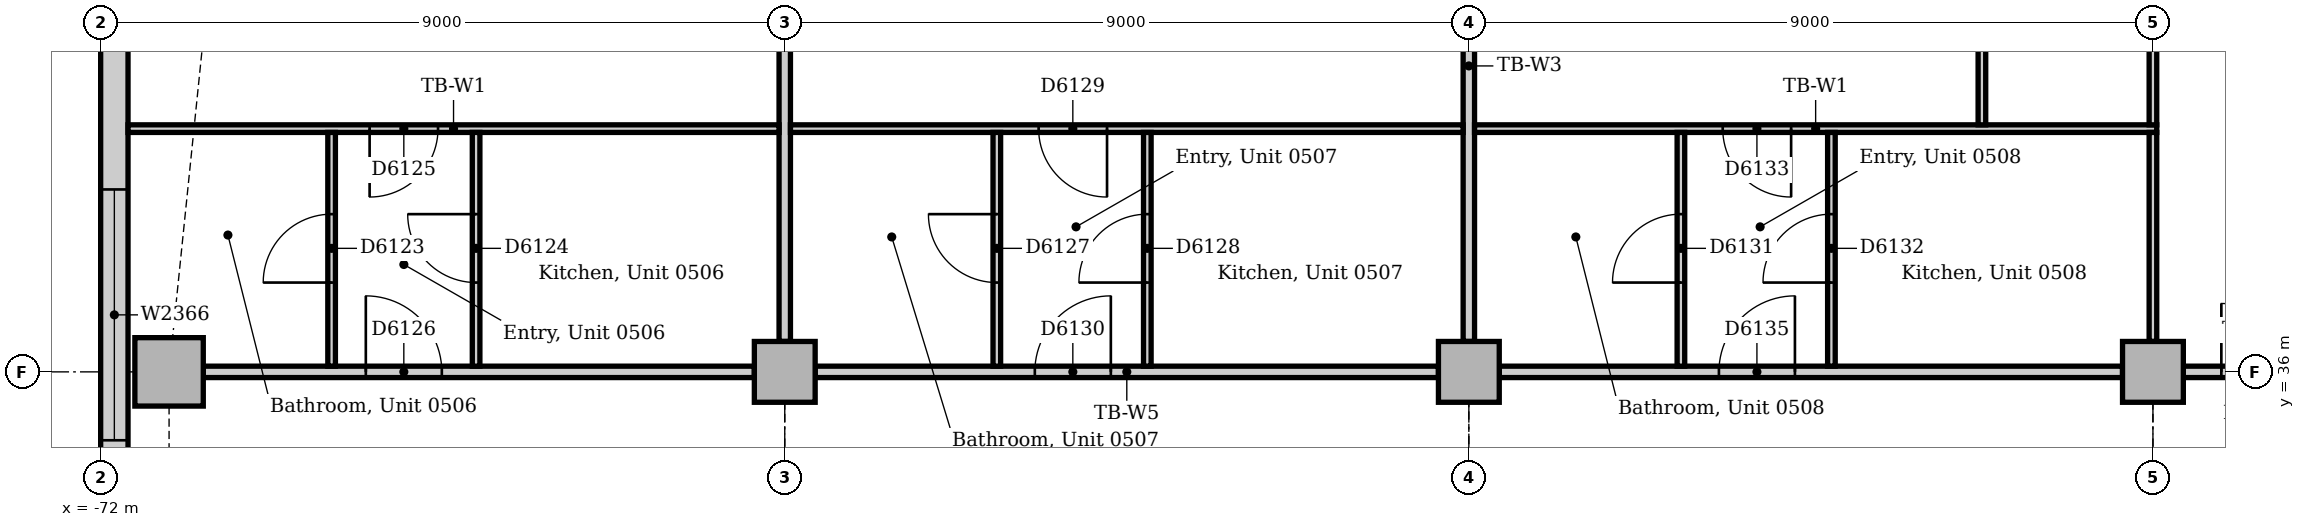
"""IFC4 building model, lengths in metres.
Left out: names, types, materials, properties, quantities, classifications, styles, units other than length and angle.
Written with IfcOpenShell. Run it as: python <this file> out.ifc"""

import sys

from ifc_helpers import new_model, si_unit, direction, frame, frame_2d, origin, origin_2d, place, context, subcontext, project, spatial, rectangle, extrude, element, fill, save


model = new_model("IFC4")
c1 = context("Model", 3, precision=1e-05, world=origin(), true_north=direction((0.0, 1.0)))
c2 = subcontext(c1, "Body", "Model", "MODEL_VIEW")
j1 = project(units=[si_unit("LENGTHUNIT", "METRE"), si_unit("PLANEANGLEUNIT", "RADIAN")], contexts=[c1])
p1 = place(None, origin())
s1 = spatial("IfcSite", under=j1, at=p1, CompositionType="ELEMENT")
p2 = place(p1, origin())
s2 = spatial("IfcBuilding", under=s1, at=p2, CompositionType="ELEMENT")
p3 = place(p2, frame((0.0, 0.0, 26.0)))
s3 = spatial("IfcBuildingStorey", under=s2, at=p3, CompositionType="ELEMENT", Elevation=26.0)
p4 = place(p3, frame((-71.1, 36.0, 0.0), z_axis=(0.0, 0.0, 1.0), x_axis=(1.0, 0.0, 0.0)))
e1 = element("IfcColumn", 1, at=p4, inside=s3, PredefinedType="COLUMN", context=c2, shape_type="SweptSolid", body=[
    extrude(rectangle(XDim=0.9, YDim=0.9, at=origin_2d()), origin(), (0.0, 0.0, 1.0), 3.85),
])
for number, where, z_axis, x_axis in (
    (2, (-63.0, 36.0, 0.0), (0.0, 0.0, 1.0), (1.0, 0.0, 0.0)),
    (3, (-54.0, 36.0, 0.0), (0.0, 0.0, 1.0), (1.0, 0.0, 0.0)),
    (4, (-45.0, 36.0, 0.0), (0.0, 0.0, 1.0), (1.0, 0.0, 0.0)),
):
    element("IfcColumn", number, at=place(p3, frame(where, z_axis=z_axis, x_axis=x_axis)), inside=s3, PredefinedType="COLUMN", context=c2, shape_type="SweptSolid", body=[
        extrude(rectangle(XDim=0.8, YDim=0.8, at=origin_2d()), origin(), (0.0, 0.0, 1.0), 3.85),
    ])
p5 = place(p3, frame((-71.82, 40.757, 0.0), z_axis=(0.0, 0.0, 1.0), x_axis=(0.0, -1.0, 0.0)))
e5 = element("IfcWall", 5, at=p5, inside=s3, PredefinedType="STANDARD", context=c2, shape_type="SweptSolid", body=[
    extrude(rectangle(XDim=26.015, YDim=0.36, at=frame_2d((13.007, 0.0))), origin(), (0.0, 0.0, 1.0), 3.85),
])
p6 = place(p5, frame((2.357, 0.0, 0.9)))
e6 = element("IfcOpeningElement", 6, at=p6, cuts=e5, PredefinedType="OPENING", context=c2, shape_type="SweptSolid", body=[
    extrude(rectangle(XDim=3.3, YDim=1.6, at=frame_2d((1.65, 0.8))), frame((0.0, 0.19, 0.0), z_axis=(0.0, -1.0, 0.0), x_axis=(1.0, 0.0, 0.0)), (0.0, 0.0, 1.0), 0.38),
])
p7 = place(p5, frame((7.057, 0.0, 0.9)))
e7 = element("IfcOpeningElement", 7, at=p7, cuts=e5, PredefinedType="OPENING", context=c2, shape_type="SweptSolid", body=[
    extrude(rectangle(XDim=3.3, YDim=1.6, at=frame_2d((1.65, 0.8))), frame((0.0, 0.19, 0.0), z_axis=(0.0, -1.0, 0.0), x_axis=(1.0, 0.0, 0.0)), (0.0, 0.0, 1.0), 0.38),
])
p8 = place(p5, frame((11.357, 0.0, 0.9)))
e8 = element("IfcOpeningElement", 8, at=p8, cuts=e5, PredefinedType="OPENING", context=c2, shape_type="SweptSolid", body=[
    extrude(rectangle(XDim=3.3, YDim=1.6, at=frame_2d((1.65, 0.8))), frame((0.0, 0.19, 0.0), z_axis=(0.0, -1.0, 0.0), x_axis=(1.0, 0.0, 0.0)), (0.0, 0.0, 1.0), 0.38),
])
p9 = place(p5, frame((15.857, 0.0, 0.9)))
e9 = element("IfcOpeningElement", 9, at=p9, cuts=e5, PredefinedType="OPENING", context=c2, shape_type="SweptSolid", body=[
    extrude(rectangle(XDim=3.3, YDim=1.6, at=frame_2d((1.65, 0.8))), frame((0.0, 0.19, 0.0), z_axis=(0.0, -1.0, 0.0), x_axis=(1.0, 0.0, 0.0)), (0.0, 0.0, 1.0), 0.38),
])
p10 = place(p5, frame((20.957, 0.0, 0.9)))
e10 = element("IfcOpeningElement", 10, at=p10, cuts=e5, PredefinedType="OPENING", context=c2, shape_type="SweptSolid", body=[
    extrude(rectangle(XDim=3.3, YDim=1.6, at=frame_2d((1.65, 0.8))), frame((0.0, 0.19, 0.0), z_axis=(0.0, -1.0, 0.0), x_axis=(1.0, 0.0, 0.0)), (0.0, 0.0, 1.0), 0.38),
])
p11 = place(p3, frame((-44.6, 36.0, 0.0), z_axis=(0.0, 0.0, 1.0), x_axis=(1.0, 0.0, 0.0)))
e11 = element("IfcWall", 11, at=p11, inside=s3, PredefinedType="PARTITIONING", context=c2, shape_type="SweptSolid", body=[
    extrude(rectangle(XDim=1.875, YDim=0.15, at=frame_2d((0.938, 0.0))), origin(), (0.0, 0.0, 1.0), 3.602),
])
p12 = place(p11, frame((0.5, 0.0, 0.0)))
e12 = element("IfcOpeningElement", 12, at=p12, cuts=e11, PredefinedType="OPENING", context=c2, shape_type="SweptSolid", body=[
    extrude(rectangle(XDim=0.9, YDim=2.1, at=frame_2d((0.45, 1.05))), frame((0.0, 0.085, 0.0), z_axis=(0.0, -1.0, 0.0), x_axis=(1.0, 0.0, 0.0)), (0.0, 0.0, 1.0), 0.17),
])
p13 = place(p3, frame((-53.6, 36.0, 0.0), z_axis=(0.0, 0.0, 1.0), x_axis=(1.0, 0.0, 0.0)))
e13 = element("IfcWall", 13, at=p13, inside=s3, PredefinedType="PARTITIONING", context=c2, shape_type="SweptSolid", body=[
    extrude(rectangle(XDim=8.2, YDim=0.15, at=frame_2d((4.1, 0.0))), origin(), (0.0, 0.0, 1.0), 3.15),
])
p14 = place(p13, frame((2.89, 0.0, 0.0)))
e14 = element("IfcOpeningElement", 14, at=p14, cuts=e13, PredefinedType="OPENING", context=c2, shape_type="SweptSolid", body=[
    extrude(rectangle(XDim=1.0, YDim=2.1, at=frame_2d((0.5, 1.05))), frame((0.0, 0.085, 0.0), z_axis=(0.0, -1.0, 0.0), x_axis=(1.0, 0.0, 0.0)), (0.0, 0.0, 1.0), 0.17),
])
p15 = place(p3, frame((-62.6, 36.0, 0.0), z_axis=(0.0, 0.0, 1.0), x_axis=(1.0, 0.0, 0.0)))
e15 = element("IfcWall", 15, at=p15, inside=s3, PredefinedType="PARTITIONING", context=c2, shape_type="SweptSolid", body=[
    extrude(rectangle(XDim=8.2, YDim=0.15, at=frame_2d((4.1, 0.0))), origin(), (0.0, 0.0, 1.0), 3.15),
])
p16 = place(p15, frame((2.89, 0.0, 0.0)))
e16 = element("IfcOpeningElement", 16, at=p16, cuts=e15, PredefinedType="OPENING", context=c2, shape_type="SweptSolid", body=[
    extrude(rectangle(XDim=1.0, YDim=2.1, at=frame_2d((0.5, 1.05))), frame((0.0, 0.085, 0.0), z_axis=(0.0, -1.0, 0.0), x_axis=(1.0, 0.0, 0.0)), (0.0, 0.0, 1.0), 0.17),
])
p17 = place(p3, frame((-70.65, 36.0, 0.0), z_axis=(0.0, 0.0, 1.0), x_axis=(1.0, 0.0, 0.0)))
e17 = element("IfcWall", 17, at=p17, inside=s3, PredefinedType="PARTITIONING", context=c2, shape_type="SweptSolid", body=[
    extrude(rectangle(XDim=7.25, YDim=0.15, at=frame_2d((3.625, 0.0))), origin(), (0.0, 0.0, 1.0), 3.15),
])
p18 = place(p17, frame((2.138, 0.0, 0.0)))
e18 = element("IfcOpeningElement", 18, at=p18, cuts=e17, PredefinedType="OPENING", context=c2, shape_type="SweptSolid", body=[
    extrude(rectangle(XDim=1.0, YDim=2.1, at=frame_2d((0.5, 1.05))), frame((0.0, 0.085, 0.0), z_axis=(0.0, -1.0, 0.0), x_axis=(1.0, 0.0, 0.0)), (0.0, 0.0, 1.0), 0.17),
])
for number, where, z_axis, x_axis in (
    (19, (-63.0, 36.4, 0.0), (0.0, 0.0, 1.0), (0.0, 1.0, 0.0)),
    (20, (-54.0, 36.4, 0.0), (0.0, 0.0, 1.0), (0.0, 1.0, 0.0)),
):
    element("IfcWall", number, at=place(p3, frame(where, z_axis=z_axis, x_axis=x_axis)), inside=s3, PredefinedType="PARTITIONING", context=c2, shape_type="SweptSolid", body=[
        extrude(rectangle(XDim=7.25, YDim=0.15, at=frame_2d((3.625, 0.0))), origin(), (0.0, 0.0, 1.0), 3.158),
    ])
p19 = place(p3, frame((-53.925, 39.2, 0.0), z_axis=(0.0, 0.0, 1.0), x_axis=(1.0, 0.0, 0.0)))
e21 = element("IfcWall", 21, at=p19, inside=s3, PredefinedType="PARTITIONING", context=c2, shape_type="SweptSolid", body=[
    extrude(rectangle(XDim=8.975, YDim=0.1, at=frame_2d((4.487, 0.0))), origin(), (0.0, 0.0, 1.0), 3.85),
])
p20 = place(p19, frame((3.265, 0.0, 0.0)))
e22 = element("IfcOpeningElement", 22, at=p20, cuts=e21, PredefinedType="OPENING", context=c2, shape_type="SweptSolid", body=[
    extrude(rectangle(XDim=0.9, YDim=2.1, at=frame_2d((0.45, 1.05))), frame((0.0, 0.06, 0.0), z_axis=(0.0, -1.0, 0.0), x_axis=(1.0, 0.0, 0.0)), (0.0, 0.0, 1.0), 0.12),
])
p21 = place(p3, frame((-62.925, 39.2, 0.0), z_axis=(0.0, 0.0, 1.0), x_axis=(1.0, 0.0, 0.0)))
e23 = element("IfcWall", 23, at=p21, inside=s3, PredefinedType="PARTITIONING", context=c2, shape_type="SweptSolid", body=[
    extrude(rectangle(XDim=8.85, YDim=0.1, at=frame_2d((4.425, 0.0))), origin(), (0.0, 0.0, 1.0), 3.85),
])
p22 = place(p21, frame((3.265, 0.0, 0.0)))
e24 = element("IfcOpeningElement", 24, at=p22, cuts=e23, PredefinedType="OPENING", context=c2, shape_type="SweptSolid", body=[
    extrude(rectangle(XDim=0.9, YDim=2.1, at=frame_2d((0.45, 1.05))), frame((0.0, 0.06, 0.0), z_axis=(0.0, -1.0, 0.0), x_axis=(1.0, 0.0, 0.0)), (0.0, 0.0, 1.0), 0.12),
])
p23 = place(p3, frame((-71.64, 39.2, 0.0), z_axis=(0.0, 0.0, 1.0), x_axis=(1.0, 0.0, 0.0)))
e25 = element("IfcWall", 25, at=p23, inside=s3, PredefinedType="PARTITIONING", context=c2, shape_type="SweptSolid", body=[
    extrude(rectangle(XDim=8.565, YDim=0.1, at=frame_2d((4.282, 0.0))), origin(), (0.0, 0.0, 1.0), 3.85),
])
p24 = place(p23, frame((3.178, 0.0, 0.0)))
e26 = element("IfcOpeningElement", 26, at=p24, cuts=e25, PredefinedType="OPENING", context=c2, shape_type="SweptSolid", body=[
    extrude(rectangle(XDim=0.9, YDim=2.1, at=frame_2d((0.45, 1.05))), frame((0.0, 0.06, 0.0), z_axis=(0.0, -1.0, 0.0), x_axis=(1.0, 0.0, 0.0)), (0.0, 0.0, 1.0), 0.12),
])
p25 = place(p3, frame((-45.0, 39.25, 0.0), z_axis=(0.0, 0.0, 1.0), x_axis=(0.0, 1.0, 0.0)))
e27 = element("IfcWall", 27, at=p25, inside=s3, PredefinedType="PARTITIONING", context=c2, shape_type="SweptSolid", body=[
    extrude(rectangle(XDim=4.4, YDim=0.1, at=frame_2d((2.2, 0.0))), origin(), (0.0, 0.0, 1.0), 3.158),
])
p26 = place(p3, frame((-45.0, 36.4, 0.0), z_axis=(0.0, 0.0, 1.0), x_axis=(0.0, 1.0, 0.0)))
e28 = element("IfcWall", 28, at=p26, inside=s3, PredefinedType="PARTITIONING", context=c2, shape_type="SweptSolid", body=[
    extrude(rectangle(XDim=2.75, YDim=0.1, at=frame_2d((1.375, 0.0))), origin(), (0.0, 0.0, 1.0), 3.158),
])
p27 = place(p3, frame((-47.25, 39.25, 0.0), z_axis=(0.0, 0.0, 1.0), x_axis=(0.0, 1.0, 0.0)))
e29 = element("IfcWall", 29, at=p27, inside=s3, PredefinedType="PARTITIONING", context=c2, shape_type="SweptSolid", body=[
    extrude(rectangle(XDim=5.39, YDim=0.1, at=frame_2d((2.695, 0.0))), origin(), (0.0, 0.0, 1.0), 3.85),
])
p28 = place(p27, frame((2.25, 0.0, 0.0)))
e30 = element("IfcOpeningElement", 30, at=p28, cuts=e29, PredefinedType="OPENING", context=c2, shape_type="SweptSolid", body=[
    extrude(rectangle(XDim=0.9, YDim=2.1, at=frame_2d((0.45, 1.05))), frame((0.0, 0.06, 0.0), z_axis=(0.0, -1.0, 0.0), x_axis=(1.0, 0.0, 0.0)), (0.0, 0.0, 1.0), 0.12),
])
p29 = place(p3, frame((-68.962, 36.075, 0.0), z_axis=(0.0, 0.0, 1.0), x_axis=(0.0, 1.0, 0.0)))
e31 = element("IfcWall", 31, at=p29, inside=s3, PredefinedType="PARTITIONING", context=c2, shape_type="SweptSolid", body=[
    extrude(rectangle(XDim=3.075, YDim=0.1, at=frame_2d((1.538, 0.0))), origin(), (0.0, 0.0, 1.0), 3.85),
])
p30 = place(p29, frame((1.1, 0.0, 0.0)))
e32 = element("IfcOpeningElement", 32, at=p30, cuts=e31, PredefinedType="OPENING", context=c2, shape_type="SweptSolid", body=[
    extrude(rectangle(XDim=0.9, YDim=2.1, at=frame_2d((0.45, 1.05))), frame((0.0, 0.06, 0.0), z_axis=(0.0, -1.0, 0.0), x_axis=(1.0, 0.0, 0.0)), (0.0, 0.0, 1.0), 0.12),
])
p31 = place(p3, frame((-67.061, 36.075, 0.0), z_axis=(0.0, 0.0, 1.0), x_axis=(0.0, 1.0, 0.0)))
e33 = element("IfcWall", 33, at=p31, inside=s3, PredefinedType="PARTITIONING", context=c2, shape_type="SweptSolid", body=[
    extrude(rectangle(XDim=3.075, YDim=0.1, at=frame_2d((1.538, 0.0))), origin(), (0.0, 0.0, 1.0), 3.85),
])
p32 = place(p31, frame((1.1, 0.0, 0.0)))
e34 = element("IfcOpeningElement", 34, at=p32, cuts=e33, PredefinedType="OPENING", context=c2, shape_type="SweptSolid", body=[
    extrude(rectangle(XDim=0.9, YDim=2.1, at=frame_2d((0.45, 1.05))), frame((0.0, 0.06, 0.0), z_axis=(0.0, -1.0, 0.0), x_axis=(1.0, 0.0, 0.0)), (0.0, 0.0, 1.0), 0.12),
])
p33 = place(p3, frame((-60.21, 36.075, 0.0), z_axis=(0.0, 0.0, 1.0), x_axis=(0.0, 1.0, 0.0)))
e35 = element("IfcWall", 35, at=p33, inside=s3, PredefinedType="PARTITIONING", context=c2, shape_type="SweptSolid", body=[
    extrude(rectangle(XDim=3.075, YDim=0.1, at=frame_2d((1.538, 0.0))), origin(), (0.0, 0.0, 1.0), 3.85),
])
p34 = place(p33, frame((1.1, 0.0, 0.0)))
e36 = element("IfcOpeningElement", 36, at=p34, cuts=e35, PredefinedType="OPENING", context=c2, shape_type="SweptSolid", body=[
    extrude(rectangle(XDim=0.9, YDim=2.1, at=frame_2d((0.45, 1.05))), frame((0.0, 0.06, 0.0), z_axis=(0.0, -1.0, 0.0), x_axis=(1.0, 0.0, 0.0)), (0.0, 0.0, 1.0), 0.12),
])
p35 = place(p3, frame((-58.23, 36.075, 0.0), z_axis=(0.0, 0.0, 1.0), x_axis=(0.0, 1.0, 0.0)))
e37 = element("IfcWall", 37, at=p35, inside=s3, PredefinedType="PARTITIONING", context=c2, shape_type="SweptSolid", body=[
    extrude(rectangle(XDim=3.075, YDim=0.1, at=frame_2d((1.538, 0.0))), origin(), (0.0, 0.0, 1.0), 3.85),
])
p36 = place(p35, frame((1.1, 0.0, 0.0)))
e38 = element("IfcOpeningElement", 38, at=p36, cuts=e37, PredefinedType="OPENING", context=c2, shape_type="SweptSolid", body=[
    extrude(rectangle(XDim=0.9, YDim=2.1, at=frame_2d((0.45, 1.05))), frame((0.0, 0.06, 0.0), z_axis=(0.0, -1.0, 0.0), x_axis=(1.0, 0.0, 0.0)), (0.0, 0.0, 1.0), 0.12),
])
p37 = place(p3, frame((-51.21, 36.075, 0.0), z_axis=(0.0, 0.0, 1.0), x_axis=(0.0, 1.0, 0.0)))
e39 = element("IfcWall", 39, at=p37, inside=s3, PredefinedType="PARTITIONING", context=c2, shape_type="SweptSolid", body=[
    extrude(rectangle(XDim=3.075, YDim=0.1, at=frame_2d((1.538, 0.0))), origin(), (0.0, 0.0, 1.0), 3.85),
])
p38 = place(p37, frame((1.1, 0.0, 0.0)))
e40 = element("IfcOpeningElement", 40, at=p38, cuts=e39, PredefinedType="OPENING", context=c2, shape_type="SweptSolid", body=[
    extrude(rectangle(XDim=0.9, YDim=2.1, at=frame_2d((0.45, 1.05))), frame((0.0, 0.06, 0.0), z_axis=(0.0, -1.0, 0.0), x_axis=(1.0, 0.0, 0.0)), (0.0, 0.0, 1.0), 0.12),
])
p39 = place(p3, frame((-49.23, 36.075, 0.0), z_axis=(0.0, 0.0, 1.0), x_axis=(0.0, 1.0, 0.0)))
e41 = element("IfcWall", 41, at=p39, inside=s3, PredefinedType="PARTITIONING", context=c2, shape_type="SweptSolid", body=[
    extrude(rectangle(XDim=3.075, YDim=0.1, at=frame_2d((1.538, 0.0))), origin(), (0.0, 0.0, 1.0), 3.85),
])
p40 = place(p39, frame((1.1, 0.0, 0.0)))
e42 = element("IfcOpeningElement", 42, at=p40, cuts=e41, PredefinedType="OPENING", context=c2, shape_type="SweptSolid", body=[
    extrude(rectangle(XDim=0.9, YDim=2.1, at=frame_2d((0.45, 1.05))), frame((0.0, 0.06, 0.0), z_axis=(0.0, -1.0, 0.0), x_axis=(1.0, 0.0, 0.0)), (0.0, 0.0, 1.0), 0.12),
])
p41 = place(p6, origin())
e43 = element("IfcWindow", 43, at=p41, inside=s3, PartitioningType="SINGLE_PANEL", PredefinedType="WINDOW", context=c2, shape_type="SweptSolid", body=[
    extrude(rectangle(XDim=3.3, YDim=1.6, at=frame_2d((1.65, 0.8))), frame((0.0, 0.13, 0.0), z_axis=(0.0, -1.0, 0.0), x_axis=(1.0, 0.0, 0.0)), (0.0, 0.0, 1.0), 0.06),
])
fill(e6, e43)
p42 = place(p12, origin())
e44 = element("IfcDoor", 44, at=p42, inside=s3, OperationType="SINGLE_SWING_LEFT", PredefinedType="DOOR", context=c2, shape_type="SweptSolid", body=[
    extrude(rectangle(XDim=0.9, YDim=2.1, at=frame_2d((0.45, 1.05))), frame((0.0, 0.025, 0.0), z_axis=(0.0, -1.0, 0.0), x_axis=(1.0, 0.0, 0.0)), (0.0, 0.0, 1.0), 0.05),
])
fill(e12, e44)
p43 = place(p30, origin())
e45 = element("IfcDoor", 45, at=p43, inside=s3, OperationType="SINGLE_SWING_LEFT", PredefinedType="DOOR", context=c2, shape_type="SweptSolid", body=[
    extrude(rectangle(XDim=0.9, YDim=2.1, at=frame_2d((0.45, 1.05))), frame((0.0, 0.025, 0.0), z_axis=(0.0, -1.0, 0.0), x_axis=(1.0, 0.0, 0.0)), (0.0, 0.0, 1.0), 0.05),
])
fill(e32, e45)
p44 = place(p32, origin())
e46 = element("IfcDoor", 46, at=p44, inside=s3, OperationType="SINGLE_SWING_RIGHT", PredefinedType="DOOR", context=c2, shape_type="SweptSolid", body=[
    extrude(rectangle(XDim=0.9, YDim=2.1, at=frame_2d((0.45, 1.05))), frame((0.0, 0.025, 0.0), z_axis=(0.0, -1.0, 0.0), x_axis=(1.0, 0.0, 0.0)), (0.0, 0.0, 1.0), 0.05),
])
fill(e34, e46)
p45 = place(p24, frame((0.9, 0.0, 0.0), z_axis=(0.0, 0.0, 1.0), x_axis=(-1.0, 0.0, 0.0)))
e47 = element("IfcDoor", 47, at=p45, inside=s3, OperationType="SINGLE_SWING_RIGHT", PredefinedType="DOOR", context=c2, shape_type="SweptSolid", body=[
    extrude(rectangle(XDim=0.9, YDim=2.1, at=frame_2d((0.45, 1.05))), frame((0.0, 0.025, 0.0), z_axis=(0.0, -1.0, 0.0), x_axis=(1.0, 0.0, 0.0)), (0.0, 0.0, 1.0), 0.05),
])
fill(e26, e47)
p46 = place(p18, origin())
e48 = element("IfcDoor", 48, at=p46, inside=s3, OperationType="SINGLE_SWING_LEFT", PredefinedType="DOOR", context=c2, shape_type="SweptSolid", body=[
    extrude(rectangle(XDim=1.0, YDim=2.1, at=frame_2d((0.5, 1.05))), frame((0.0, 0.025, 0.0), z_axis=(0.0, -1.0, 0.0), x_axis=(1.0, 0.0, 0.0)), (0.0, 0.0, 1.0), 0.05),
])
fill(e18, e48)
p47 = place(p34, origin())
e49 = element("IfcDoor", 49, at=p47, inside=s3, OperationType="SINGLE_SWING_RIGHT", PredefinedType="DOOR", context=c2, shape_type="SweptSolid", body=[
    extrude(rectangle(XDim=0.9, YDim=2.1, at=frame_2d((0.45, 1.05))), frame((0.0, 0.025, 0.0), z_axis=(0.0, -1.0, 0.0), x_axis=(1.0, 0.0, 0.0)), (0.0, 0.0, 1.0), 0.05),
])
fill(e36, e49)
p48 = place(p36, origin())
e50 = element("IfcDoor", 50, at=p48, inside=s3, OperationType="SINGLE_SWING_LEFT", PredefinedType="DOOR", context=c2, shape_type="SweptSolid", body=[
    extrude(rectangle(XDim=0.9, YDim=2.1, at=frame_2d((0.45, 1.05))), frame((0.0, 0.025, 0.0), z_axis=(0.0, -1.0, 0.0), x_axis=(1.0, 0.0, 0.0)), (0.0, 0.0, 1.0), 0.05),
])
fill(e38, e50)
p49 = place(p22, frame((0.9, 0.0, 0.0), z_axis=(0.0, 0.0, 1.0), x_axis=(-1.0, 0.0, 0.0)))
e51 = element("IfcDoor", 51, at=p49, inside=s3, OperationType="SINGLE_SWING_LEFT", PredefinedType="DOOR", context=c2, shape_type="SweptSolid", body=[
    extrude(rectangle(XDim=0.9, YDim=2.1, at=frame_2d((0.45, 1.05))), frame((0.0, 0.025, 0.0), z_axis=(0.0, -1.0, 0.0), x_axis=(1.0, 0.0, 0.0)), (0.0, 0.0, 1.0), 0.05),
])
fill(e24, e51)
p50 = place(p16, origin())
e52 = element("IfcDoor", 52, at=p50, inside=s3, OperationType="SINGLE_SWING_RIGHT", PredefinedType="DOOR", context=c2, shape_type="SweptSolid", body=[
    extrude(rectangle(XDim=1.0, YDim=2.1, at=frame_2d((0.5, 1.05))), frame((0.0, 0.025, 0.0), z_axis=(0.0, -1.0, 0.0), x_axis=(1.0, 0.0, 0.0)), (0.0, 0.0, 1.0), 0.05),
])
fill(e16, e52)
p51 = place(p38, origin())
e53 = element("IfcDoor", 53, at=p51, inside=s3, OperationType="SINGLE_SWING_LEFT", PredefinedType="DOOR", context=c2, shape_type="SweptSolid", body=[
    extrude(rectangle(XDim=0.9, YDim=2.1, at=frame_2d((0.45, 1.05))), frame((0.0, 0.025, 0.0), z_axis=(0.0, -1.0, 0.0), x_axis=(1.0, 0.0, 0.0)), (0.0, 0.0, 1.0), 0.05),
])
fill(e40, e53)
p52 = place(p40, origin())
e54 = element("IfcDoor", 54, at=p52, inside=s3, OperationType="SINGLE_SWING_LEFT", PredefinedType="DOOR", context=c2, shape_type="SweptSolid", body=[
    extrude(rectangle(XDim=0.9, YDim=2.1, at=frame_2d((0.45, 1.05))), frame((0.0, 0.025, 0.0), z_axis=(0.0, -1.0, 0.0), x_axis=(1.0, 0.0, 0.0)), (0.0, 0.0, 1.0), 0.05),
])
fill(e42, e54)
p53 = place(p20, frame((0.9, 0.0, 0.0), z_axis=(0.0, 0.0, 1.0), x_axis=(-1.0, 0.0, 0.0)))
e55 = element("IfcDoor", 55, at=p53, inside=s3, OperationType="SINGLE_SWING_LEFT", PredefinedType="DOOR", context=c2, shape_type="SweptSolid", body=[
    extrude(rectangle(XDim=0.9, YDim=2.1, at=frame_2d((0.45, 1.05))), frame((0.0, 0.025, 0.0), z_axis=(0.0, -1.0, 0.0), x_axis=(1.0, 0.0, 0.0)), (0.0, 0.0, 1.0), 0.05),
])
fill(e22, e55)
p54 = place(p14, origin())
e56 = element("IfcDoor", 56, at=p54, inside=s3, OperationType="SINGLE_SWING_RIGHT", PredefinedType="DOOR", context=c2, shape_type="SweptSolid", body=[
    extrude(rectangle(XDim=1.0, YDim=2.1, at=frame_2d((0.5, 1.05))), frame((0.0, 0.025, 0.0), z_axis=(0.0, -1.0, 0.0), x_axis=(1.0, 0.0, 0.0)), (0.0, 0.0, 1.0), 0.05),
])
fill(e14, e56)
save(model, sys.argv[1])
